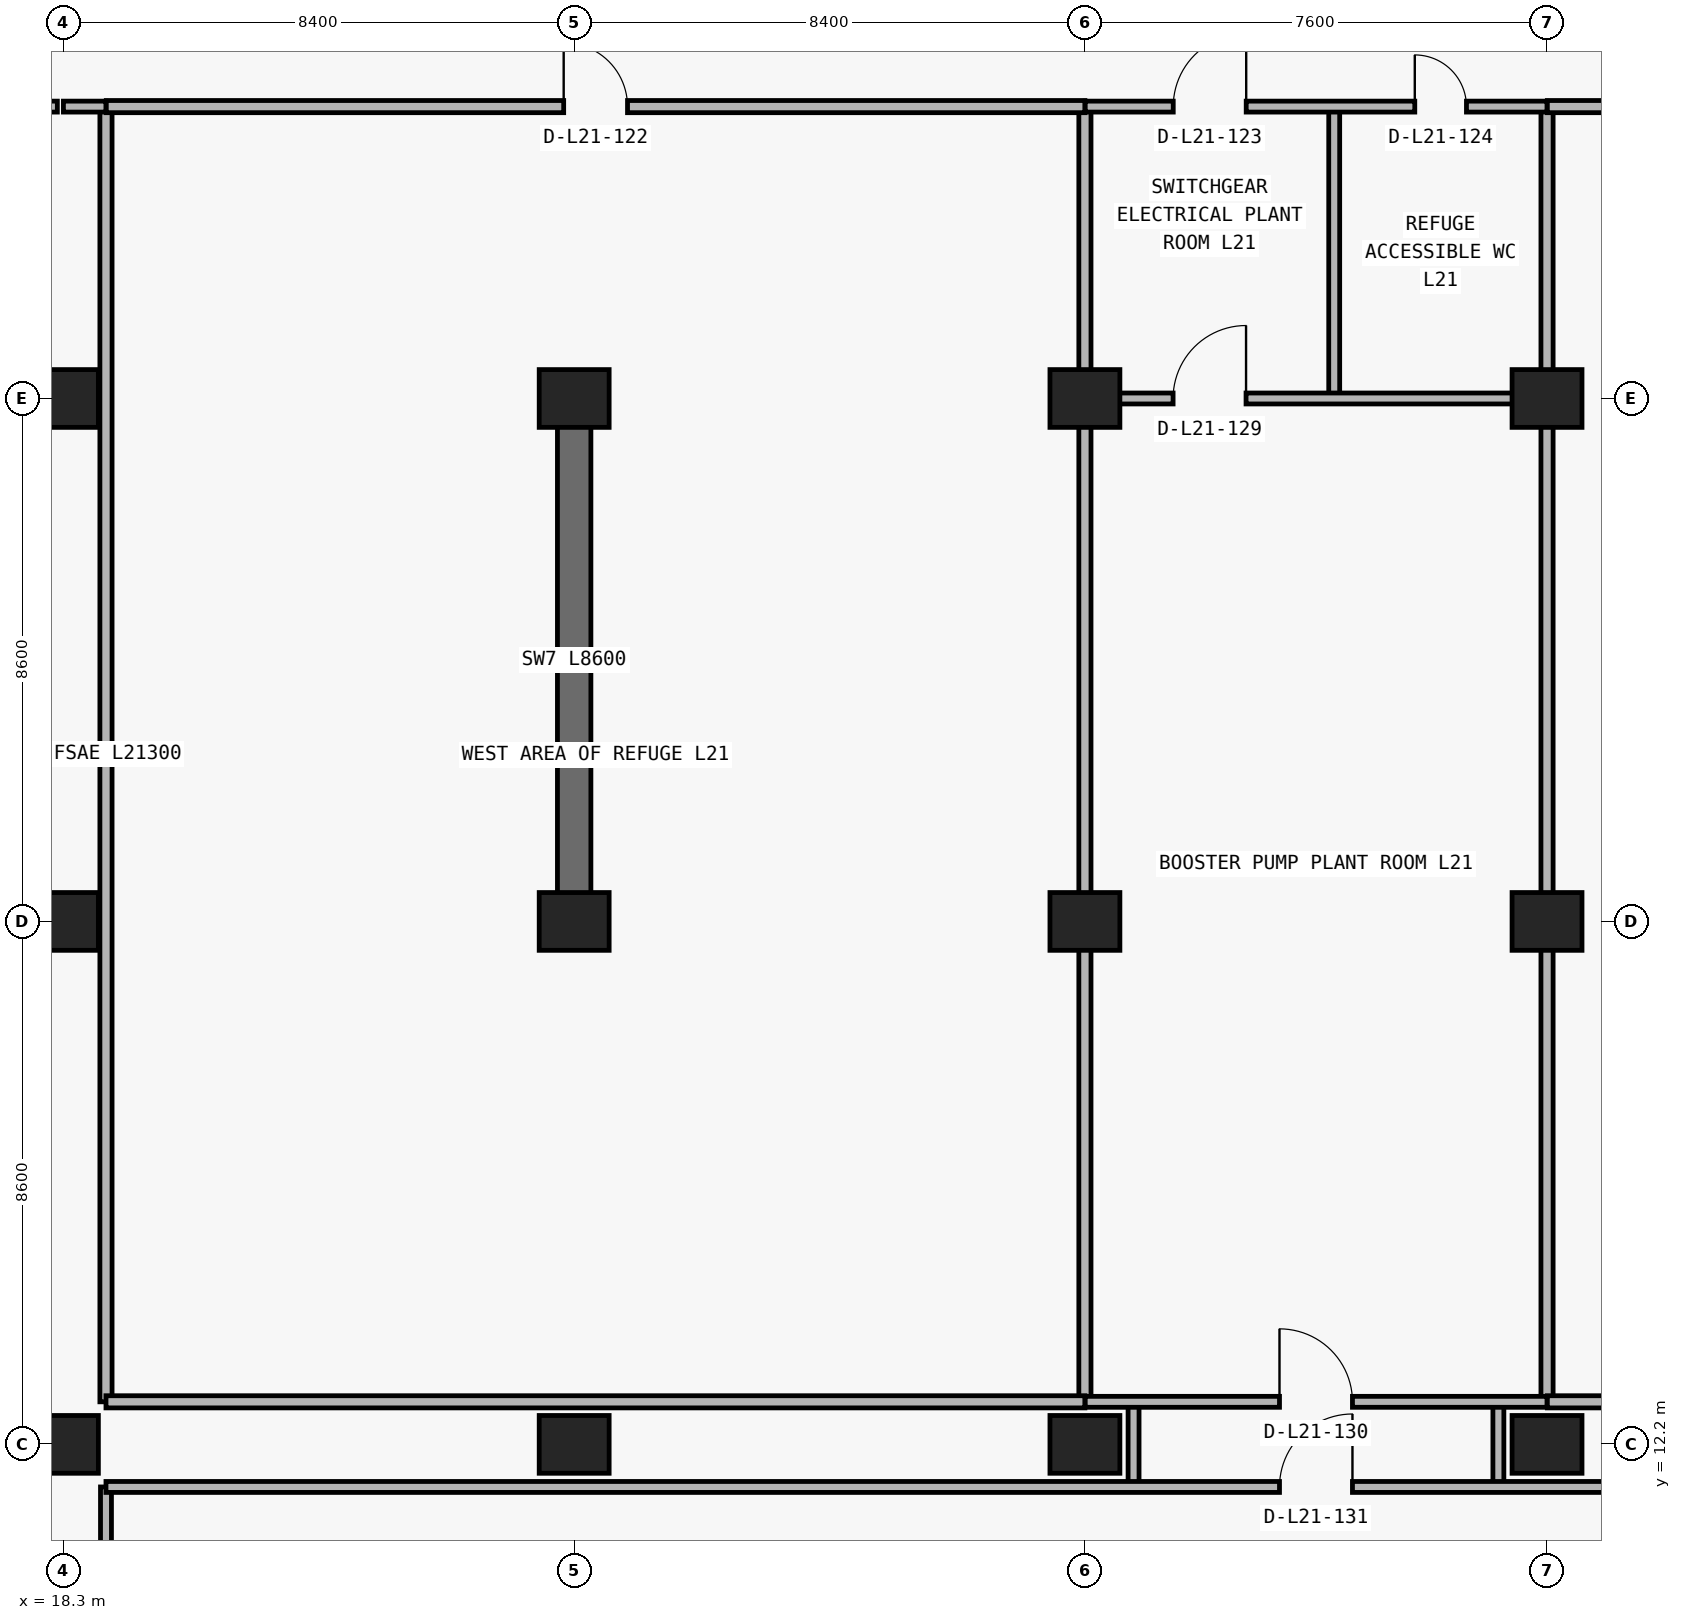
"""IFC4 building model, lengths in metres.
Left out: names, types, materials, properties, quantities, classifications, styles, units other than length and angle.
Written with IfcOpenShell. Run it as: python <this file> out.ifc"""

import sys

from ifc_helpers import new_model, si_unit, direction, frame, frame_2d, origin, origin_2d, place, context, subcontext, project, spatial, rectangle, extrude, element, fill, save


model = new_model("IFC4")
c1 = context("Model", 3, precision=1e-05, world=origin(), true_north=direction((0.0, 1.0)))
c2 = subcontext(c1, "Body", "Model", "MODEL_VIEW")
j1 = project(units=[si_unit("LENGTHUNIT", "METRE"), si_unit("PLANEANGLEUNIT", "RADIAN")], contexts=[c1])
p1 = place(None, origin())
s1 = spatial("IfcSite", under=j1, at=p1, CompositionType="ELEMENT")
p2 = place(p1, origin())
s2 = spatial("IfcBuilding", under=s1, at=p2, CompositionType="ELEMENT")
p3 = place(p2, frame((0.0, 0.0, 79.5)))
s3 = spatial("IfcBuildingStorey", under=s2, at=p3, CompositionType="ELEMENT", Elevation=79.5)
for number, where, z_axis, x_axis in (
    (1, (18.3, 12.2, 0.0), (0.0, 0.0, 1.0), (1.0, 0.0, 0.0)),
    (2, (26.7, 12.2, 0.0), (0.0, 0.0, 1.0), (1.0, 0.0, 0.0)),
    (3, (35.1, 12.2, 0.0), (0.0, 0.0, 1.0), (1.0, 0.0, 0.0)),
    (4, (42.7, 12.2, 0.0), (0.0, 0.0, 1.0), (1.0, 0.0, 0.0)),
    (5, (18.3, 20.8, 0.0), (0.0, 0.0, 1.0), (1.0, 0.0, 0.0)),
    (6, (26.7, 20.8, 0.0), (0.0, 0.0, 1.0), (1.0, 0.0, 0.0)),
    (7, (35.1, 20.8, 0.0), (0.0, 0.0, 1.0), (1.0, 0.0, 0.0)),
    (8, (42.7, 20.8, 0.0), (0.0, 0.0, 1.0), (1.0, 0.0, 0.0)),
    (9, (18.3, 29.4, 0.0), (0.0, 0.0, 1.0), (1.0, 0.0, 0.0)),
    (10, (26.7, 29.4, 0.0), (0.0, 0.0, 1.0), (1.0, 0.0, 0.0)),
    (11, (35.1, 29.4, 0.0), (0.0, 0.0, 1.0), (1.0, 0.0, 0.0)),
    (12, (42.7, 29.4, 0.0), (0.0, 0.0, 1.0), (1.0, 0.0, 0.0)),
):
    element("IfcColumn", number, at=place(p3, frame(where, z_axis=z_axis, x_axis=x_axis)), inside=s3, PredefinedType="COLUMN", context=c2, shape_type="SweptSolid", body=[
        extrude(rectangle(XDim=1.15, YDim=0.95, at=origin_2d()), origin(), (0.0, 0.0, 1.0), 4.85),
    ])
p4 = place(p3, frame((26.7, 20.8, 0.0), z_axis=(0.0, 0.0, 1.0), x_axis=(0.0, 1.0, 0.0)))
e13 = element("IfcWall", 13, at=p4, inside=s3, PredefinedType="SHEAR", context=c2, shape_type="SweptSolid", body=[
    extrude(rectangle(XDim=8.6, YDim=0.55, at=frame_2d((4.3, 0.0))), origin(), (0.0, 0.0, 1.0), 4.85),
])
p5 = place(p3, frame((19.0, 3.295, 0.0), z_axis=(0.0, 0.0, 1.0), x_axis=(0.0, 1.0, 0.0)))
e14 = element("IfcWall", 14, at=p5, inside=s3, PredefinedType="PARTITIONING", context=c2, shape_type="SweptSolid", body=[
    extrude(rectangle(XDim=8.205, YDim=0.18, at=frame_2d((4.103, 0.0))), origin(), (0.0, 0.0, 1.0), 4.85),
])
p6 = place(p3, frame((19.0, 12.9, 0.0), z_axis=(0.0, 0.0, 1.0), x_axis=(0.0, 1.0, 0.0)))
e15 = element("IfcWall", 15, at=p6, inside=s3, PredefinedType="PARTITIONING", context=c2, shape_type="SweptSolid", body=[
    extrude(rectangle(XDim=21.3, YDim=0.2, at=frame_2d((10.65, 0.0))), origin(), (0.0, 0.0, 1.0), 4.85),
])
p7 = place(p3, frame((35.1, 12.9, 0.0), z_axis=(0.0, 0.0, 1.0), x_axis=(0.0, 1.0, 0.0)))
e16 = element("IfcWall", 16, at=p7, inside=s3, PredefinedType="PARTITIONING", context=c2, shape_type="SweptSolid", body=[
    extrude(rectangle(XDim=21.3, YDim=0.2, at=frame_2d((10.65, 0.0))), origin(), (0.0, 0.0, 1.0), 3.814),
])
p8 = place(p3, frame((35.9, 11.5, 0.0), z_axis=(0.0, 0.0, 1.0), x_axis=(0.0, 1.0, 0.0)))
e17 = element("IfcWall", 17, at=p8, inside=s3, PredefinedType="PARTITIONING", context=c2, shape_type="SweptSolid", body=[
    extrude(rectangle(XDim=1.4, YDim=0.18, at=frame_2d((0.7, 0.0))), origin(), (0.0, 0.0, 1.0), 4.85),
])
p9 = place(p3, frame((39.2, 29.4, 0.0), z_axis=(0.0, 0.0, 1.0), x_axis=(0.0, 1.0, 0.0)))
e18 = element("IfcWall", 18, at=p9, inside=s3, PredefinedType="PARTITIONING", context=c2, shape_type="SweptSolid", body=[
    extrude(rectangle(XDim=4.8, YDim=0.18, at=frame_2d((2.4, 0.0))), origin(), (0.0, 0.0, 1.0), 4.85),
])
p10 = place(p3, frame((41.9, 11.5, 0.0), z_axis=(0.0, 0.0, 1.0), x_axis=(0.0, 1.0, 0.0)))
e19 = element("IfcWall", 19, at=p10, inside=s3, PredefinedType="PARTITIONING", context=c2, shape_type="SweptSolid", body=[
    extrude(rectangle(XDim=1.4, YDim=0.18, at=frame_2d((0.7, 0.0))), origin(), (0.0, 0.0, 1.0), 4.85),
])
p11 = place(p3, frame((42.7, 12.9, 0.0), z_axis=(0.0, 0.0, 1.0), x_axis=(0.0, 1.0, 0.0)))
e20 = element("IfcWall", 20, at=p11, inside=s3, PredefinedType="PARTITIONING", context=c2, shape_type="SweptSolid", body=[
    extrude(rectangle(XDim=21.3, YDim=0.2, at=frame_2d((10.65, 0.0))), origin(), (0.0, 0.0, 1.0), 3.814),
])
p12 = place(p3, frame((19.0, 11.5, 0.0), z_axis=(0.0, 0.0, 1.0), x_axis=(1.0, 0.0, 0.0)))
e21 = element("IfcWall", 21, at=p12, inside=s3, PredefinedType="PARTITIONING", context=c2, shape_type="SweptSolid", body=[
    extrude(rectangle(XDim=39.8, YDim=0.18, at=frame_2d((19.9, 0.0))), origin(), (0.0, 0.0, 1.0), 4.85),
])
p13 = place(p12, frame((19.3, 0.0, 0.0)))
e22 = element("IfcOpeningElement", 22, at=p13, cuts=e21, PredefinedType="OPENING", context=c2, shape_type="SweptSolid", body=[
    extrude(rectangle(XDim=1.2, YDim=2.2, at=frame_2d((0.6, 1.1))), frame((0.0, 0.1, 0.0), z_axis=(0.0, -1.0, 0.0), x_axis=(1.0, 0.0, 0.0)), (0.0, 0.0, 1.0), 0.2),
])
p14 = place(p3, frame((19.0, 12.9, 0.0), z_axis=(0.0, 0.0, 1.0), x_axis=(1.0, 0.0, 0.0)))
e23 = element("IfcWall", 23, at=p14, inside=s3, PredefinedType="PARTITIONING", context=c2, shape_type="SweptSolid", body=[
    extrude(rectangle(XDim=16.1, YDim=0.2, at=frame_2d((8.05, 0.0))), origin(), (0.0, 0.0, 1.0), 4.85),
])
p15 = place(p3, frame((35.105, 12.9, 0.0), z_axis=(0.0, 0.0, 1.0), x_axis=(1.0, 0.0, 0.0)))
e24 = element("IfcWall", 24, at=p15, inside=s3, PredefinedType="PARTITIONING", context=c2, shape_type="SweptSolid", body=[
    extrude(rectangle(XDim=7.595, YDim=0.18, at=frame_2d((3.797, 0.0))), origin(), (0.0, 0.0, 1.0), 4.85),
])
p16 = place(p15, frame((3.195, 0.0, 0.0)))
e25 = element("IfcOpeningElement", 25, at=p16, cuts=e24, PredefinedType="OPENING", context=c2, shape_type="SweptSolid", body=[
    extrude(rectangle(XDim=1.2, YDim=2.2, at=frame_2d((0.6, 1.1))), frame((0.0, 0.1, 0.0), z_axis=(0.0, -1.0, 0.0), x_axis=(1.0, 0.0, 0.0)), (0.0, 0.0, 1.0), 0.2),
])
p17 = place(p3, frame((42.705, 12.9, 0.0), z_axis=(0.0, 0.0, 1.0), x_axis=(1.0, 0.0, 0.0)))
e26 = element("IfcWall", 26, at=p17, inside=s3, PredefinedType="PARTITIONING", context=c2, shape_type="SweptSolid", body=[
    extrude(rectangle(XDim=16.095, YDim=0.2, at=frame_2d((8.047, 0.0))), origin(), (0.0, 0.0, 1.0), 4.85),
])
p18 = place(p3, frame((35.1, 29.4, 0.0), z_axis=(0.0, 0.0, 1.0), x_axis=(1.0, 0.0, 0.0)))
e27 = element("IfcWall", 27, at=p18, inside=s3, PredefinedType="PARTITIONING", context=c2, shape_type="SweptSolid", body=[
    extrude(rectangle(XDim=7.6, YDim=0.18, at=frame_2d((3.8, 0.0))), origin(), (0.0, 0.0, 1.0), 3.814),
])
p19 = place(p18, frame((1.45, 0.0, 0.0)))
e28 = element("IfcOpeningElement", 28, at=p19, cuts=e27, PredefinedType="OPENING", context=c2, shape_type="SweptSolid", body=[
    extrude(rectangle(XDim=1.2, YDim=2.2, at=frame_2d((0.6, 1.1))), frame((0.0, 0.1, 0.0), z_axis=(0.0, -1.0, 0.0), x_axis=(1.0, 0.0, 0.0)), (0.0, 0.0, 1.0), 0.2),
])
p20 = place(p3, frame((5.1, 34.2, 0.0), z_axis=(0.0, 0.0, 1.0), x_axis=(1.0, 0.0, 0.0)))
e29 = element("IfcWall", 29, at=p20, inside=s3, PredefinedType="PARTITIONING", context=c2, shape_type="SweptSolid", body=[
    extrude(rectangle(XDim=13.1, YDim=0.18, at=frame_2d((6.55, 0.0))), origin(), (0.0, 0.0, 1.0), 4.85),
])
p21 = place(p20, frame((5.65, 0.0, 0.0)))
e30 = element("IfcOpeningElement", 30, at=p21, cuts=e29, PredefinedType="OPENING", context=c2, shape_type="SweptSolid", body=[
    extrude(rectangle(XDim=1.2, YDim=2.2, at=frame_2d((0.6, 1.1))), frame((0.0, 0.1, 0.0), z_axis=(0.0, -1.0, 0.0), x_axis=(1.0, 0.0, 0.0)), (0.0, 0.0, 1.0), 0.2),
])
p22 = place(p3, frame((18.3, 34.2, 0.0), z_axis=(0.0, 0.0, 1.0), x_axis=(1.0, 0.0, 0.0)))
e31 = element("IfcWall", 31, at=p22, inside=s3, PredefinedType="PARTITIONING", context=c2, shape_type="SweptSolid", body=[
    extrude(rectangle(XDim=0.7, YDim=0.18, at=frame_2d((0.35, 0.0))), origin(), (0.0, 0.0, 1.0), 4.85),
])
p23 = place(p3, frame((19.005, 34.2, 0.0), z_axis=(0.0, 0.0, 1.0), x_axis=(1.0, 0.0, 0.0)))
e32 = element("IfcWall", 32, at=p23, inside=s3, PredefinedType="PARTITIONING", context=c2, shape_type="SweptSolid", body=[
    extrude(rectangle(XDim=16.095, YDim=0.2, at=frame_2d((8.048, 0.0))), origin(), (0.0, 0.0, 1.0), 4.85),
])
p24 = place(p23, frame((7.522, 0.0, 0.0)))
e33 = element("IfcOpeningElement", 33, at=p24, cuts=e32, PredefinedType="OPENING", context=c2, shape_type="SweptSolid", body=[
    extrude(rectangle(XDim=1.05, YDim=2.15, at=frame_2d((0.525, 1.075))), frame((0.0, 0.11, 0.0), z_axis=(0.0, -1.0, 0.0), x_axis=(1.0, 0.0, 0.0)), (0.0, 0.0, 1.0), 0.22),
])
p25 = place(p3, frame((35.105, 34.2, 0.0), z_axis=(0.0, 0.0, 1.0), x_axis=(1.0, 0.0, 0.0)))
e34 = element("IfcWall", 34, at=p25, inside=s3, PredefinedType="PARTITIONING", context=c2, shape_type="SweptSolid", body=[
    extrude(rectangle(XDim=7.595, YDim=0.18, at=frame_2d((3.797, 0.0))), origin(), (0.0, 0.0, 1.0), 4.85),
])
p26 = place(p25, frame((1.448, 0.0, 0.0)))
e35 = element("IfcOpeningElement", 35, at=p26, cuts=e34, PredefinedType="OPENING", context=c2, shape_type="SweptSolid", body=[
    extrude(rectangle(XDim=1.2, YDim=2.2, at=frame_2d((0.6, 1.1))), frame((0.0, 0.1, 0.0), z_axis=(0.0, -1.0, 0.0), x_axis=(1.0, 0.0, 0.0)), (0.0, 0.0, 1.0), 0.2),
])
p27 = place(p25, frame((5.42, 0.0, 0.0)))
e36 = element("IfcOpeningElement", 36, at=p27, cuts=e34, PredefinedType="OPENING", context=c2, shape_type="SweptSolid", body=[
    extrude(rectangle(XDim=0.85, YDim=2.1, at=frame_2d((0.425, 1.05))), frame((0.0, 0.1, 0.0), z_axis=(0.0, -1.0, 0.0), x_axis=(1.0, 0.0, 0.0)), (0.0, 0.0, 1.0), 0.2),
])
p28 = place(p3, frame((42.705, 34.2, 0.0), z_axis=(0.0, 0.0, 1.0), x_axis=(1.0, 0.0, 0.0)))
e37 = element("IfcWall", 37, at=p28, inside=s3, PredefinedType="PARTITIONING", context=c2, shape_type="SweptSolid", body=[
    extrude(rectangle(XDim=16.095, YDim=0.2, at=frame_2d((8.047, 0.0))), origin(), (0.0, 0.0, 1.0), 4.85),
])
p29 = place(p28, frame((7.522, 0.0, 0.0)))
e38 = element("IfcOpeningElement", 38, at=p29, cuts=e37, PredefinedType="OPENING", context=c2, shape_type="SweptSolid", body=[
    extrude(rectangle(XDim=1.05, YDim=2.15, at=frame_2d((0.525, 1.075))), frame((0.0, 0.11, 0.0), z_axis=(0.0, -1.0, 0.0), x_axis=(1.0, 0.0, 0.0)), (0.0, 0.0, 1.0), 0.22),
])
p30 = place(p24, origin())
e39 = element("IfcDoor", 39, at=p30, inside=s3, OperationType="SINGLE_SWING_LEFT", PredefinedType="DOOR", context=c2, shape_type="SweptSolid", body=[
    extrude(rectangle(XDim=1.05, YDim=2.15, at=frame_2d((0.525, 1.075))), frame((0.0, 0.025, 0.0), z_axis=(0.0, -1.0, 0.0), x_axis=(1.0, 0.0, 0.0)), (0.0, 0.0, 1.0), 0.05),
])
fill(e33, e39)
p31 = place(p26, origin())
e40 = element("IfcDoor", 40, at=p31, inside=s3, OperationType="SINGLE_SWING_RIGHT", PredefinedType="DOOR", context=c2, shape_type="SweptSolid", body=[
    extrude(rectangle(XDim=1.2, YDim=2.2, at=frame_2d((0.6, 1.1))), frame((0.0, 0.025, 0.0), z_axis=(0.0, -1.0, 0.0), x_axis=(1.0, 0.0, 0.0)), (0.0, 0.0, 1.0), 0.05),
])
fill(e35, e40)
p32 = place(p27, origin())
e41 = element("IfcDoor", 41, at=p32, inside=s3, OperationType="SINGLE_SWING_LEFT", PredefinedType="DOOR", context=c2, shape_type="SweptSolid", body=[
    extrude(rectangle(XDim=0.85, YDim=2.1, at=frame_2d((0.425, 1.05))), frame((0.0, 0.025, 0.0), z_axis=(0.0, -1.0, 0.0), x_axis=(1.0, 0.0, 0.0)), (0.0, 0.0, 1.0), 0.05),
])
fill(e36, e41)
p33 = place(p19, origin())
e42 = element("IfcDoor", 42, at=p33, inside=s3, OperationType="SINGLE_SWING_RIGHT", PredefinedType="DOOR", context=c2, shape_type="SweptSolid", body=[
    extrude(rectangle(XDim=1.2, YDim=2.2, at=frame_2d((0.6, 1.1))), frame((0.0, 0.025, 0.0), z_axis=(0.0, -1.0, 0.0), x_axis=(1.0, 0.0, 0.0)), (0.0, 0.0, 1.0), 0.05),
])
fill(e28, e42)
p34 = place(p16, origin())
e43 = element("IfcDoor", 43, at=p34, inside=s3, OperationType="SINGLE_SWING_LEFT", PredefinedType="DOOR", context=c2, shape_type="SweptSolid", body=[
    extrude(rectangle(XDim=1.2, YDim=2.2, at=frame_2d((0.6, 1.1))), frame((0.0, 0.025, 0.0), z_axis=(0.0, -1.0, 0.0), x_axis=(1.0, 0.0, 0.0)), (0.0, 0.0, 1.0), 0.05),
])
fill(e25, e43)
p35 = place(p13, origin())
e44 = element("IfcDoor", 44, at=p35, inside=s3, OperationType="SINGLE_SWING_RIGHT", PredefinedType="DOOR", context=c2, shape_type="SweptSolid", body=[
    extrude(rectangle(XDim=1.2, YDim=2.2, at=frame_2d((0.6, 1.1))), frame((0.0, 0.025, 0.0), z_axis=(0.0, -1.0, 0.0), x_axis=(1.0, 0.0, 0.0)), (0.0, 0.0, 1.0), 0.05),
])
fill(e22, e44)
save(model, sys.argv[1])
